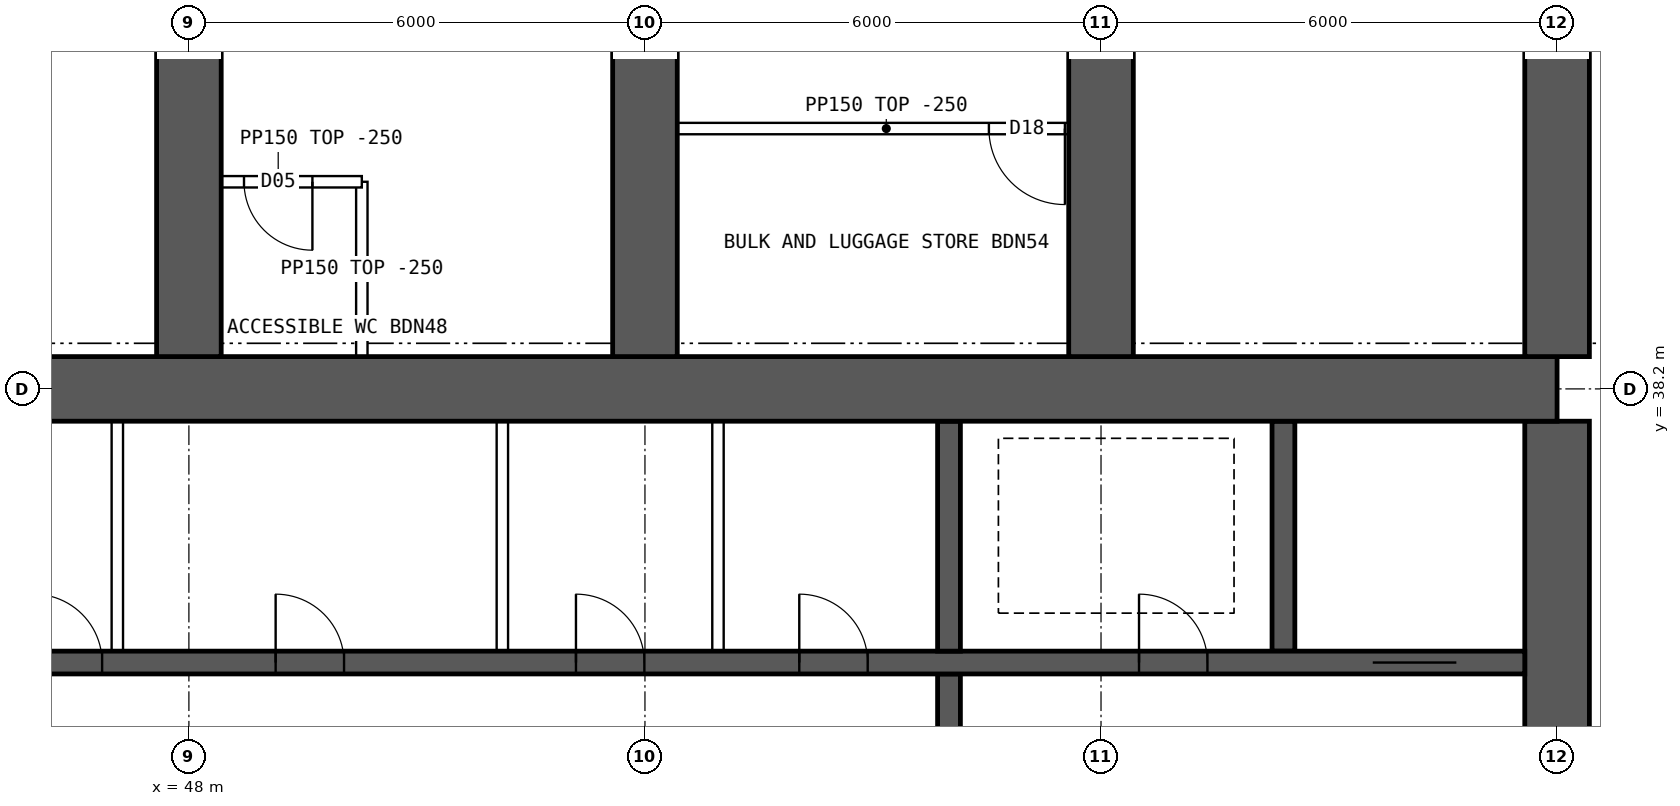
"""IFC4 building model, lengths in metres.
Left out: names, types, materials, properties, quantities, classifications, styles, units other than length and angle.
Written with IfcOpenShell. Run it as: python <this file> out.ifc"""

import sys

from ifc_helpers import new_model, si_unit, direction, frame, frame_2d, origin, place, context, subcontext, project, spatial, rectangle, extrude, element, fill, save


model = new_model("IFC4")
c1 = context("Model", 3, precision=1e-05, world=origin(), true_north=direction((0.0, 1.0)))
c2 = subcontext(c1, "Body", "Model", "MODEL_VIEW")
j1 = project(units=[si_unit("LENGTHUNIT", "METRE"), si_unit("PLANEANGLEUNIT", "RADIAN")], contexts=[c1])
p1 = place(None, origin())
s1 = spatial("IfcSite", under=j1, at=p1, CompositionType="ELEMENT")
p2 = place(p1, origin())
s2 = spatial("IfcBuilding", under=s1, at=p2, CompositionType="ELEMENT")
p3 = place(p2, frame((0.0, 0.0, 186.1)))
s3 = spatial("IfcBuildingStorey", under=s2, at=p3, CompositionType="ELEMENT", Elevation=186.1)
p4 = place(p3, frame((18.0, 38.2, 0.0), z_axis=(0.0, 0.0, 1.0), x_axis=(1.0, 0.0, 0.0)))
e1 = element("IfcWall", 1, at=p4, inside=s3, PredefinedType="SHEAR", context=c2, shape_type="SweptSolid", body=[
    extrude(rectangle(XDim=48.0, YDim=0.85, at=frame_2d((24.0, 0.0))), origin(), (0.0, 0.0, 1.0), 3.75),
])
p5 = place(p3, frame((66.0, 26.225, 0.0), z_axis=(0.0, 0.0, 1.0), x_axis=(0.0, 1.0, 0.0)))
e2 = element("IfcWall", 2, at=p5, inside=s3, PredefinedType="SHEAR", context=c2, shape_type="SweptSolid", body=[
    extrude(rectangle(XDim=11.55, YDim=0.85, at=frame_2d((5.775, 0.0))), origin(), (0.0, 0.0, 1.0), 3.75),
])
p6 = place(p5, frame((5.075, 0.0, 0.0)))
e3 = element("IfcOpeningElement", 3, at=p6, cuts=e2, PredefinedType="OPENING", context=c2, shape_type="SweptSolid", body=[
    extrude(rectangle(XDim=1.2, YDim=2.1, at=frame_2d((0.6, 1.05))), frame((0.0, 0.435, 0.0), z_axis=(0.0, -1.0, 0.0), x_axis=(1.0, 0.0, 0.0)), (0.0, 0.0, 1.0), 0.87),
])
p7 = place(p3, frame((18.425, 34.6, 0.0), z_axis=(0.0, 0.0, 1.0), x_axis=(1.0, 0.0, 0.0)))
e4 = element("IfcWall", 4, at=p7, inside=s3, PredefinedType="SHEAR", context=c2, shape_type="SweptSolid", body=[
    extrude(rectangle(XDim=47.15, YDim=0.3, at=frame_2d((23.575, 0.0))), origin(), (0.0, 0.0, 1.0), 3.75),
])
p8 = place(p7, frame((0.9, 0.0, 0.0)))
e5 = element("IfcOpeningElement", 5, at=p8, cuts=e4, PredefinedType="OPENING", context=c2, shape_type="SweptSolid", body=[
    extrude(rectangle(XDim=1.1, YDim=2.1, at=frame_2d((0.55, 1.05))), frame((0.0, 0.16, 0.0), z_axis=(0.0, -1.0, 0.0), x_axis=(1.0, 0.0, 0.0)), (0.0, 0.0, 1.0), 0.32),
])
p9 = place(p7, frame((45.15, 0.0, 0.0)))
e6 = element("IfcOpeningElement", 6, at=p9, cuts=e4, PredefinedType="OPENING", context=c2, shape_type="SweptSolid", body=[
    extrude(rectangle(XDim=1.1, YDim=2.1, at=frame_2d((0.55, 1.05))), frame((0.0, 0.16, 0.0), z_axis=(0.0, -1.0, 0.0), x_axis=(1.0, 0.0, 0.0)), (0.0, 0.0, 1.0), 0.32),
])
p10 = place(p7, frame((4.175, 0.0, 0.0)))
e7 = element("IfcOpeningElement", 7, at=p10, cuts=e4, PredefinedType="OPENING", context=c2, shape_type="SweptSolid", body=[
    extrude(rectangle(XDim=0.9, YDim=2.1, at=frame_2d((0.45, 1.05))), frame((0.0, 0.16, 0.0), z_axis=(0.0, -1.0, 0.0), x_axis=(1.0, 0.0, 0.0)), (0.0, 0.0, 1.0), 0.32),
])
p11 = place(p7, frame((42.075, 0.0, 0.0)))
e8 = element("IfcOpeningElement", 8, at=p11, cuts=e4, PredefinedType="OPENING", context=c2, shape_type="SweptSolid", body=[
    extrude(rectangle(XDim=0.9, YDim=2.1, at=frame_2d((0.45, 1.05))), frame((0.0, 0.16, 0.0), z_axis=(0.0, -1.0, 0.0), x_axis=(1.0, 0.0, 0.0)), (0.0, 0.0, 1.0), 0.32),
])
p12 = place(p7, frame((8.95, 0.0, 0.0)))
e9 = element("IfcOpeningElement", 9, at=p12, cuts=e4, PredefinedType="OPENING", context=c2, shape_type="SweptSolid", body=[
    extrude(rectangle(XDim=0.9, YDim=2.1, at=frame_2d((0.45, 1.05))), frame((0.0, 0.16, 0.0), z_axis=(0.0, -1.0, 0.0), x_axis=(1.0, 0.0, 0.0)), (0.0, 0.0, 1.0), 0.32),
])
p13 = place(p7, frame((12.924, 0.0, 0.0)))
e10 = element("IfcOpeningElement", 10, at=p13, cuts=e4, PredefinedType="OPENING", context=c2, shape_type="SweptSolid", body=[
    extrude(rectangle(XDim=0.9, YDim=2.1, at=frame_2d((0.45, 1.05))), frame((0.0, 0.16, 0.0), z_axis=(0.0, -1.0, 0.0), x_axis=(1.0, 0.0, 0.0)), (0.0, 0.0, 1.0), 0.32),
])
p14 = place(p7, frame((16.571, 0.0, 0.0)))
e11 = element("IfcOpeningElement", 11, at=p14, cuts=e4, PredefinedType="OPENING", context=c2, shape_type="SweptSolid", body=[
    extrude(rectangle(XDim=0.9, YDim=2.1, at=frame_2d((0.45, 1.05))), frame((0.0, 0.16, 0.0), z_axis=(0.0, -1.0, 0.0), x_axis=(1.0, 0.0, 0.0)), (0.0, 0.0, 1.0), 0.32),
])
p15 = place(p7, frame((20.33, 0.0, 0.0)))
e12 = element("IfcOpeningElement", 12, at=p15, cuts=e4, PredefinedType="OPENING", context=c2, shape_type="SweptSolid", body=[
    extrude(rectangle(XDim=0.9, YDim=2.1, at=frame_2d((0.45, 1.05))), frame((0.0, 0.16, 0.0), z_axis=(0.0, -1.0, 0.0), x_axis=(1.0, 0.0, 0.0)), (0.0, 0.0, 1.0), 0.32),
])
p16 = place(p7, frame((24.736, 0.0, 0.0)))
e13 = element("IfcOpeningElement", 13, at=p16, cuts=e4, PredefinedType="OPENING", context=c2, shape_type="SweptSolid", body=[
    extrude(rectangle(XDim=0.9, YDim=2.1, at=frame_2d((0.45, 1.05))), frame((0.0, 0.16, 0.0), z_axis=(0.0, -1.0, 0.0), x_axis=(1.0, 0.0, 0.0)), (0.0, 0.0, 1.0), 0.32),
])
p17 = place(p7, frame((27.533, 0.0, 0.0)))
e14 = element("IfcOpeningElement", 14, at=p17, cuts=e4, PredefinedType="OPENING", context=c2, shape_type="SweptSolid", body=[
    extrude(rectangle(XDim=0.9, YDim=2.1, at=frame_2d((0.45, 1.05))), frame((0.0, 0.16, 0.0), z_axis=(0.0, -1.0, 0.0), x_axis=(1.0, 0.0, 0.0)), (0.0, 0.0, 1.0), 0.32),
])
p18 = place(p7, frame((30.716, 0.0, 0.0)))
e15 = element("IfcOpeningElement", 15, at=p18, cuts=e4, PredefinedType="OPENING", context=c2, shape_type="SweptSolid", body=[
    extrude(rectangle(XDim=0.9, YDim=2.1, at=frame_2d((0.45, 1.05))), frame((0.0, 0.16, 0.0), z_axis=(0.0, -1.0, 0.0), x_axis=(1.0, 0.0, 0.0)), (0.0, 0.0, 1.0), 0.32),
])
p19 = place(p7, frame((34.667, 0.0, 0.0)))
e16 = element("IfcOpeningElement", 16, at=p19, cuts=e4, PredefinedType="OPENING", context=c2, shape_type="SweptSolid", body=[
    extrude(rectangle(XDim=0.9, YDim=2.1, at=frame_2d((0.45, 1.05))), frame((0.0, 0.16, 0.0), z_axis=(0.0, -1.0, 0.0), x_axis=(1.0, 0.0, 0.0)), (0.0, 0.0, 1.0), 0.32),
])
p20 = place(p7, frame((37.605, 0.0, 0.0)))
e17 = element("IfcOpeningElement", 17, at=p20, cuts=e4, PredefinedType="OPENING", context=c2, shape_type="SweptSolid", body=[
    extrude(rectangle(XDim=0.9, YDim=2.1, at=frame_2d((0.45, 1.05))), frame((0.0, 0.16, 0.0), z_axis=(0.0, -1.0, 0.0), x_axis=(1.0, 0.0, 0.0)), (0.0, 0.0, 1.0), 0.32),
])
p21 = place(p3, frame((58.0, 30.55, 0.0), z_axis=(0.0, 0.0, 1.0), x_axis=(0.0, 1.0, 0.0)))
e18 = element("IfcWall", 18, at=p21, inside=s3, PredefinedType="SHEAR", context=c2, shape_type="SweptSolid", body=[
    extrude(rectangle(XDim=3.9, YDim=0.3, at=frame_2d((1.95, 0.0))), origin(), (0.0, 0.0, 1.0), 3.75),
])
p22 = place(p21, frame((1.4, 0.0, 0.0)))
e19 = element("IfcOpeningElement", 19, at=p22, cuts=e18, PredefinedType="OPENING", context=c2, shape_type="SweptSolid", body=[
    extrude(rectangle(XDim=1.2, YDim=2.1, at=frame_2d((0.6, 1.05))), frame((0.0, 0.16, 0.0), z_axis=(0.0, -1.0, 0.0), x_axis=(1.0, 0.0, 0.0)), (0.0, 0.0, 1.0), 0.32),
])
for number, where, z_axis, x_axis in (
    (20, (62.4, 34.75, 0.0), (0.0, 0.0, 1.0), (0.0, 1.0, 0.0)),
    (21, (58.0, 34.75, 0.0), (0.0, 0.0, 1.0), (0.0, 1.0, 0.0)),
):
    element("IfcWall", number, at=place(p3, frame(where, z_axis=z_axis, x_axis=x_axis)), inside=s3, PredefinedType="SHEAR", context=c2, shape_type="SweptSolid", body=[
        extrude(rectangle(XDim=3.025, YDim=0.3, at=frame_2d((1.512, 0.0))), origin(), (0.0, 0.0, 1.0), 3.75),
    ])
for number, where, z_axis, x_axis in (
    (22, (48.0, 38.625, 0.0), (0.0, 0.0, 1.0), (0.0, 1.0, 0.0)),
    (23, (54.0, 38.625, 0.0), (0.0, 0.0, 1.0), (0.0, 1.0, 0.0)),
    (24, (60.0, 38.625, 0.0), (0.0, 0.0, 1.0), (0.0, 1.0, 0.0)),
    (25, (66.0, 38.625, 0.0), (0.0, 0.0, 1.0), (0.0, 1.0, 0.0)),
):
    element("IfcWall", number, at=place(p3, frame(where, z_axis=z_axis, x_axis=x_axis)), inside=s3, PredefinedType="SHEAR", context=c2, shape_type="SweptSolid", body=[
        extrude(rectangle(XDim=8.175, YDim=0.85, at=frame_2d((4.087, 0.0))), origin(), (0.0, 0.0, 1.0), 3.75),
    ])
for number, where, z_axis, x_axis in (
    (26, (47.058, 34.75, 0.0), (0.0, 0.0, 1.0), (0.0, 1.0, 0.0)),
    (27, (52.124, 34.75, 0.0), (0.0, 0.0, 1.0), (0.0, 1.0, 0.0)),
    (28, (54.961, 34.75, 0.0), (0.0, 0.0, 1.0), (0.0, 1.0, 0.0)),
):
    element("IfcWall", number, at=place(p3, frame(where, z_axis=z_axis, x_axis=x_axis)), inside=s3, PredefinedType="SOLIDWALL", context=c2, shape_type="SweptSolid", body=[
        extrude(rectangle(XDim=3.025, YDim=0.15, at=frame_2d((1.512, 0.0))), origin(), (0.0, 0.0, 1.0), 3.5),
    ])
p23 = place(p3, frame((50.275, 40.925, 0.0), z_axis=(0.0, 0.0, 1.0), x_axis=(0.0, -1.0, 0.0)))
e29 = element("IfcWall", 29, at=p23, inside=s3, PredefinedType="PARTITIONING", context=c2, shape_type="SweptSolid", body=[
    extrude(rectangle(XDim=2.3, YDim=0.15, at=frame_2d((1.15, 0.0))), origin(), (0.0, 0.0, 1.0), 3.5),
])
p24 = place(p3, frame((50.275, 40.925, 0.0), z_axis=(0.0, 0.0, 1.0), x_axis=(-1.0, 0.0, 0.0)))
e30 = element("IfcWall", 30, at=p24, inside=s3, PredefinedType="PARTITIONING", context=c2, shape_type="SweptSolid", body=[
    extrude(rectangle(XDim=2.2, YDim=0.15, at=frame_2d((1.1, 0.0))), origin(), (0.0, 0.0, 1.0), 3.5),
])
p25 = place(p24, frame((0.65, 0.0, 0.0)))
e31 = element("IfcOpeningElement", 31, at=p25, cuts=e30, PredefinedType="OPENING", context=c2, shape_type="SweptSolid", body=[
    extrude(rectangle(XDim=0.9, YDim=2.1, at=frame_2d((0.45, 1.05))), frame((0.0, 0.085, 0.0), z_axis=(0.0, -1.0, 0.0), x_axis=(1.0, 0.0, 0.0)), (0.0, 0.0, 1.0), 0.17),
])
p26 = place(p3, frame((59.925, 41.625, 0.0), z_axis=(0.0, 0.0, 1.0), x_axis=(-1.0, 0.0, 0.0)))
e32 = element("IfcWall", 32, at=p26, inside=s3, PredefinedType="PARTITIONING", context=c2, shape_type="SweptSolid", body=[
    extrude(rectangle(XDim=5.5, YDim=0.15, at=frame_2d((2.75, 0.0))), origin(), (0.0, 0.0, 1.0), 3.5),
])
p27 = place(p26, frame((0.4, 0.0, 0.0)))
e33 = element("IfcOpeningElement", 33, at=p27, cuts=e32, PredefinedType="OPENING", context=c2, shape_type="SweptSolid", body=[
    extrude(rectangle(XDim=1.0, YDim=2.1, at=frame_2d((0.5, 1.05))), frame((0.0, 0.085, 0.0), z_axis=(0.0, -1.0, 0.0), x_axis=(1.0, 0.0, 0.0)), (0.0, 0.0, 1.0), 0.17),
])
p28 = place(p9, origin())
e34 = element("IfcDoor", 34, at=p28, inside=s3, OperationType="DOUBLE_DOOR_SLIDING", PredefinedType="DOOR", context=c2, shape_type="SweptSolid", body=[
    extrude(rectangle(XDim=1.1, YDim=2.1, at=frame_2d((0.55, 1.05))), frame((0.0, 0.025, 0.0), z_axis=(0.0, -1.0, 0.0), x_axis=(1.0, 0.0, 0.0)), (0.0, 0.0, 1.0), 0.05),
])
fill(e6, e34)
p29 = place(p11, origin())
e35 = element("IfcDoor", 35, at=p29, inside=s3, OperationType="SINGLE_SWING_LEFT", PredefinedType="DOOR", context=c2, shape_type="SweptSolid", body=[
    extrude(rectangle(XDim=0.9, YDim=2.1, at=frame_2d((0.45, 1.05))), frame((0.0, 0.025, 0.0), z_axis=(0.0, -1.0, 0.0), x_axis=(1.0, 0.0, 0.0)), (0.0, 0.0, 1.0), 0.05),
])
fill(e8, e35)
p30 = place(p17, origin())
e36 = element("IfcDoor", 36, at=p30, inside=s3, OperationType="SINGLE_SWING_LEFT", PredefinedType="DOOR", context=c2, shape_type="SweptSolid", body=[
    extrude(rectangle(XDim=0.9, YDim=2.1, at=frame_2d((0.45, 1.05))), frame((0.0, 0.025, 0.0), z_axis=(0.0, -1.0, 0.0), x_axis=(1.0, 0.0, 0.0)), (0.0, 0.0, 1.0), 0.05),
])
fill(e14, e36)
p31 = place(p18, origin())
e37 = element("IfcDoor", 37, at=p31, inside=s3, OperationType="SINGLE_SWING_LEFT", PredefinedType="DOOR", context=c2, shape_type="SweptSolid", body=[
    extrude(rectangle(XDim=0.9, YDim=2.1, at=frame_2d((0.45, 1.05))), frame((0.0, 0.025, 0.0), z_axis=(0.0, -1.0, 0.0), x_axis=(1.0, 0.0, 0.0)), (0.0, 0.0, 1.0), 0.05),
])
fill(e15, e37)
p32 = place(p19, origin())
e38 = element("IfcDoor", 38, at=p32, inside=s3, OperationType="SINGLE_SWING_LEFT", PredefinedType="DOOR", context=c2, shape_type="SweptSolid", body=[
    extrude(rectangle(XDim=0.9, YDim=2.1, at=frame_2d((0.45, 1.05))), frame((0.0, 0.025, 0.0), z_axis=(0.0, -1.0, 0.0), x_axis=(1.0, 0.0, 0.0)), (0.0, 0.0, 1.0), 0.05),
])
fill(e16, e38)
p33 = place(p20, origin())
e39 = element("IfcDoor", 39, at=p33, inside=s3, OperationType="SINGLE_SWING_LEFT", PredefinedType="DOOR", context=c2, shape_type="SweptSolid", body=[
    extrude(rectangle(XDim=0.9, YDim=2.1, at=frame_2d((0.45, 1.05))), frame((0.0, 0.025, 0.0), z_axis=(0.0, -1.0, 0.0), x_axis=(1.0, 0.0, 0.0)), (0.0, 0.0, 1.0), 0.05),
])
fill(e17, e39)
p34 = place(p25, origin())
e40 = element("IfcDoor", 40, at=p34, inside=s3, OperationType="SINGLE_SWING_LEFT", PredefinedType="DOOR", context=c2, shape_type="SweptSolid", body=[
    extrude(rectangle(XDim=0.9, YDim=2.1, at=frame_2d((0.45, 1.05))), frame((0.0, 0.025, 0.0), z_axis=(0.0, -1.0, 0.0), x_axis=(1.0, 0.0, 0.0)), (0.0, 0.0, 1.0), 0.05),
])
fill(e31, e40)
p35 = place(p27, origin())
e41 = element("IfcDoor", 41, at=p35, inside=s3, OperationType="SINGLE_SWING_LEFT", PredefinedType="DOOR", context=c2, shape_type="SweptSolid", body=[
    extrude(rectangle(XDim=1.0, YDim=2.1, at=frame_2d((0.5, 1.05))), frame((0.0, 0.025, 0.0), z_axis=(0.0, -1.0, 0.0), x_axis=(1.0, 0.0, 0.0)), (0.0, 0.0, 1.0), 0.05),
])
fill(e33, e41)
save(model, sys.argv[1])
